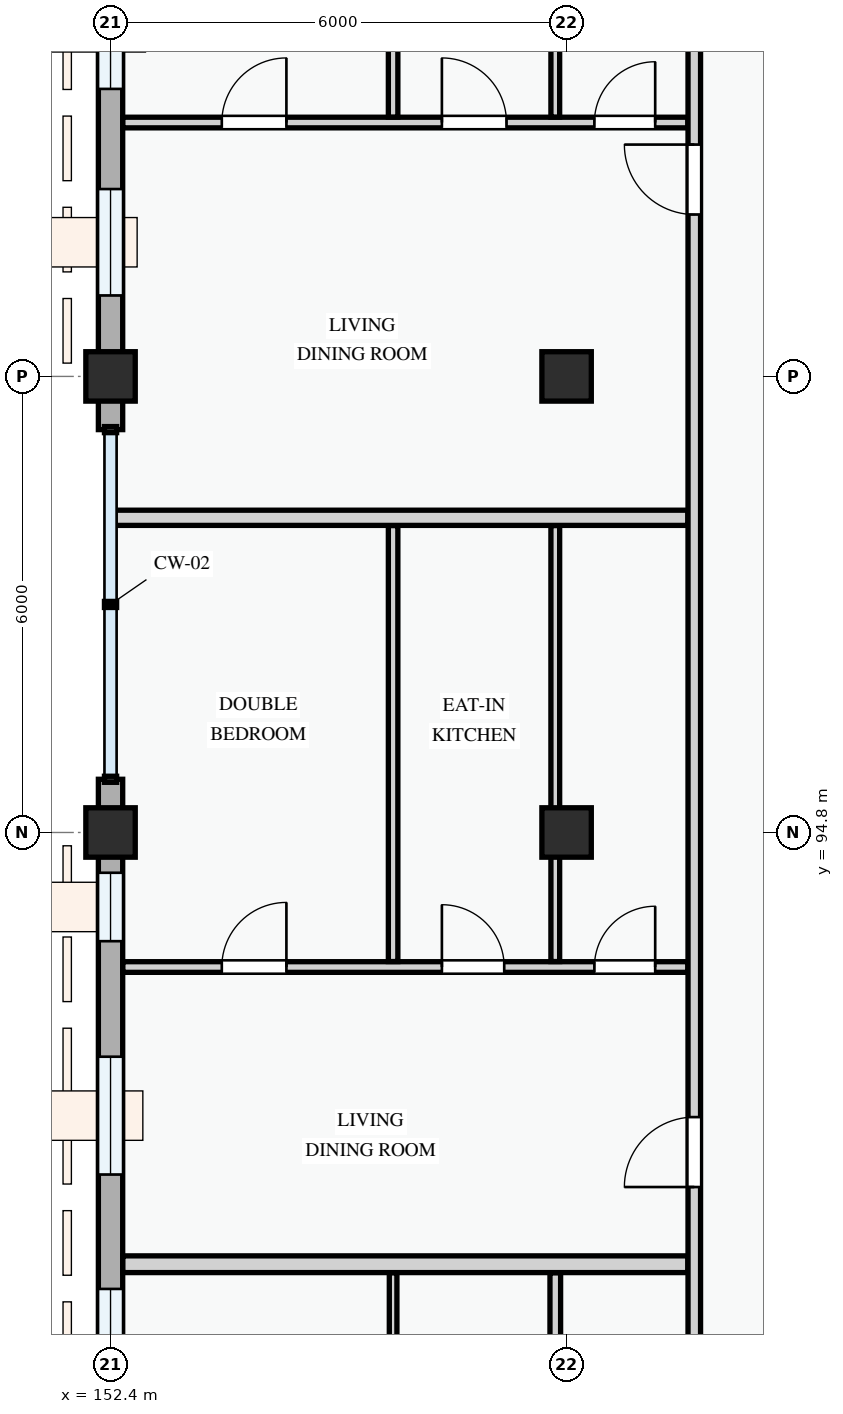
"""IFC4 building model, lengths in metres.
Left out: names, types, materials, properties, quantities, classifications, styles, units other than length and angle.
Written with IfcOpenShell. Run it as: python <this file> out.ifc"""

import sys

from ifc_helpers import new_model, si_unit, direction, frame, frame_2d, origin, origin_2d, place, context, subcontext, project, spatial, rectangle, extrude, element, fill, save


model = new_model("IFC4")
c1 = context("Model", 3, precision=1e-05, world=origin(), true_north=direction((0.0, 1.0)))
c2 = subcontext(c1, "Body", "Model", "MODEL_VIEW")
j1 = project(units=[si_unit("LENGTHUNIT", "METRE"), si_unit("PLANEANGLEUNIT", "RADIAN")], contexts=[c1])
p1 = place(None, origin())
s1 = spatial("IfcSite", under=j1, at=p1, CompositionType="ELEMENT")
p2 = place(p1, origin())
s2 = spatial("IfcBuilding", under=s1, at=p2, CompositionType="ELEMENT")
p3 = place(p2, frame((0.0, 0.0, 18.0)))
s3 = spatial("IfcBuildingStorey", under=s2, at=p3, CompositionType="ELEMENT", Elevation=18.0)
for number, where, z_axis, x_axis in (
    (1, (152.4, 94.8, 0.0), (0.0, 0.0, 1.0), (1.0, 0.0, 0.0)),
    (2, (152.4, 100.8, 0.0), (0.0, 0.0, 1.0), (1.0, 0.0, 0.0)),
    (3, (158.4, 94.8, 0.0), (0.0, 0.0, 1.0), (1.0, 0.0, 0.0)),
    (4, (158.4, 100.8, 0.0), (0.0, 0.0, 1.0), (1.0, 0.0, 0.0)),
):
    element("IfcColumn", number, at=place(p3, frame(where, z_axis=z_axis, x_axis=x_axis)), inside=s3, PredefinedType="COLUMN", context=c2, shape_type="SweptSolid", body=[
        extrude(rectangle(XDim=0.65, YDim=0.65, at=origin_2d()), origin(), (0.0, 0.0, 1.0), 3.3),
    ])
p4 = place(p3, frame((152.4, 109.2, 0.0), z_axis=(0.0, 0.0, 1.0), x_axis=(0.0, -1.0, 0.0)))
e5 = element("IfcWall", 5, at=p4, inside=s3, PredefinedType="STANDARD", context=c2, shape_type="SweptSolid", body=[
    extrude(rectangle(XDim=8.4, YDim=0.32, at=frame_2d((4.2, 0.0))), origin(), (0.0, 0.0, 1.0), 2.425),
])
p5 = place(p4, frame((0.817, 0.0, 0.78)))
e6 = element("IfcOpeningElement", 6, at=p5, cuts=e5, PredefinedType="OPENING", context=c2, shape_type="SweptSolid", body=[
    extrude(rectangle(XDim=1.25, YDim=1.45, at=frame_2d((0.625, 0.725))), frame((0.0, 0.17, 0.0), z_axis=(0.0, -1.0, 0.0), x_axis=(1.0, 0.0, 0.0)), (0.0, 0.0, 1.0), 0.34),
])
p6 = place(p4, frame((2.998, 0.0, 0.78)))
e7 = element("IfcOpeningElement", 7, at=p6, cuts=e5, PredefinedType="OPENING", context=c2, shape_type="SweptSolid", body=[
    extrude(rectangle(XDim=1.62, YDim=1.38, at=frame_2d((0.81, 0.69))), frame((0.0, 0.17, 0.0), z_axis=(0.0, -1.0, 0.0), x_axis=(1.0, 0.0, 0.0)), (0.0, 0.0, 1.0), 0.34),
])
p7 = place(p4, frame((5.935, 0.0, 0.78)))
e8 = element("IfcOpeningElement", 8, at=p7, cuts=e5, PredefinedType="OPENING", context=c2, shape_type="SweptSolid", body=[
    extrude(rectangle(XDim=1.4, YDim=1.45, at=frame_2d((0.7, 0.725))), frame((0.0, 0.17, 0.0), z_axis=(0.0, -1.0, 0.0), x_axis=(1.0, 0.0, 0.0)), (0.0, 0.0, 1.0), 0.34),
])
for number, where, z_axis, x_axis in (
    (9, (152.4, 100.8, 0.0), (0.0, 0.0, 1.0), (0.0, -1.0, 0.0)),
    (10, (152.4, 95.5, 0.0), (0.0, 0.0, 1.0), (0.0, -1.0, 0.0)),
):
    element("IfcWall", number, at=place(p3, frame(where, z_axis=z_axis, x_axis=x_axis)), inside=s3, PredefinedType="STANDARD", context=c2, shape_type="SweptSolid", body=[
        extrude(rectangle(XDim=0.7, YDim=0.32, at=frame_2d((0.35, 0.0))), origin(), (0.0, 0.0, 1.0), 2.575),
    ])
p8 = place(p3, frame((152.4, 94.8, 0.0), z_axis=(0.0, 0.0, 1.0), x_axis=(0.0, -1.0, 0.0)))
e11 = element("IfcWall", 11, at=p8, inside=s3, PredefinedType="STANDARD", context=c2, shape_type="SweptSolid", body=[
    extrude(rectangle(XDim=8.4, YDim=0.32, at=frame_2d((4.2, 0.0))), origin(), (0.0, 0.0, 1.0), 2.425),
])
p9 = place(p8, frame((0.53, 0.0, 0.78)))
e12 = element("IfcOpeningElement", 12, at=p9, cuts=e11, PredefinedType="OPENING", context=c2, shape_type="SweptSolid", body=[
    extrude(rectangle(XDim=0.9, YDim=1.2, at=frame_2d((0.45, 0.6))), frame((0.0, 0.17, 0.0), z_axis=(0.0, -1.0, 0.0), x_axis=(1.0, 0.0, 0.0)), (0.0, 0.0, 1.0), 0.34),
])
p10 = place(p8, frame((2.95, 0.0, 0.78)))
e13 = element("IfcOpeningElement", 13, at=p10, cuts=e11, PredefinedType="OPENING", context=c2, shape_type="SweptSolid", body=[
    extrude(rectangle(XDim=1.55, YDim=1.4, at=frame_2d((0.775, 0.7))), frame((0.0, 0.17, 0.0), z_axis=(0.0, -1.0, 0.0), x_axis=(1.0, 0.0, 0.0)), (0.0, 0.0, 1.0), 0.34),
])
p11 = place(p8, frame((6.005, 0.0, 0.78)))
e14 = element("IfcOpeningElement", 14, at=p11, cuts=e11, PredefinedType="OPENING", context=c2, shape_type="SweptSolid", body=[
    extrude(rectangle(XDim=1.88, YDim=1.52, at=frame_2d((0.94, 0.76))), frame((0.0, 0.17, 0.0), z_axis=(0.0, -1.0, 0.0), x_axis=(1.0, 0.0, 0.0)), (0.0, 0.0, 1.0), 0.34),
])
p12 = place(p3, frame((156.118, 84.649, 0.0), z_axis=(0.0, 0.0, 1.0), x_axis=(0.0, 1.0, 0.0)))
e15 = element("IfcWall", 15, at=p12, inside=s3, PredefinedType="PARTITIONING", context=c2, shape_type="SweptSolid", body=[
    extrude(rectangle(XDim=4.359, YDim=0.1, at=frame_2d((2.179, 0.0))), origin(), (0.0, 0.0, 1.0), 3.0),
])
p13 = place(p3, frame((158.251, 84.649, 0.0), z_axis=(0.0, 0.0, 1.0), x_axis=(0.0, 1.0, 0.0)))
e16 = element("IfcWall", 16, at=p13, inside=s3, PredefinedType="PARTITIONING", context=c2, shape_type="SweptSolid", body=[
    extrude(rectangle(XDim=4.359, YDim=0.14, at=frame_2d((2.179, 0.0))), origin(), (0.0, 0.0, 1.0), 2.425),
])
p14 = place(p3, frame((152.562, 93.03, 0.0), z_axis=(0.0, 0.0, 1.0), x_axis=(1.0, 0.0, 0.0)))
e17 = element("IfcWall", 17, at=p14, inside=s3, PredefinedType="PARTITIONING", context=c2, shape_type="SweptSolid", body=[
    extrude(rectangle(XDim=7.434, YDim=0.14, at=frame_2d((3.717, 0.0))), origin(), (0.0, 0.0, 1.0), 3.0),
])
p15 = place(p14, frame((1.302, 0.0, 0.0)))
e18 = element("IfcOpeningElement", 18, at=p15, cuts=e17, PredefinedType="OPENING", context=c2, shape_type="SweptSolid", body=[
    extrude(rectangle(XDim=0.85, YDim=2.1, at=frame_2d((0.425, 1.05))), frame((0.0, 0.08, 0.0), z_axis=(0.0, -1.0, 0.0), x_axis=(1.0, 0.0, 0.0)), (0.0, 0.0, 1.0), 0.16),
])
p16 = place(p14, frame((4.198, 0.0, 0.0)))
e19 = element("IfcOpeningElement", 19, at=p16, cuts=e17, PredefinedType="OPENING", context=c2, shape_type="SweptSolid", body=[
    extrude(rectangle(XDim=0.82, YDim=2.08, at=frame_2d((0.41, 1.04))), frame((0.0, 0.08, 0.0), z_axis=(0.0, -1.0, 0.0), x_axis=(1.0, 0.0, 0.0)), (0.0, 0.0, 1.0), 0.16),
])
p17 = place(p14, frame((6.204, 0.0, 0.0)))
e20 = element("IfcOpeningElement", 20, at=p17, cuts=e17, PredefinedType="OPENING", context=c2, shape_type="SweptSolid", body=[
    extrude(rectangle(XDim=0.8, YDim=2.1, at=frame_2d((0.4, 1.05))), frame((0.0, 0.08, 0.0), z_axis=(0.0, -1.0, 0.0), x_axis=(1.0, 0.0, 0.0)), (0.0, 0.0, 1.0), 0.16),
])
p18 = place(p3, frame((156.118, 93.102, 0.0), z_axis=(0.0, 0.0, 1.0), x_axis=(0.0, 1.0, 0.0)))
e21 = element("IfcWall", 21, at=p18, inside=s3, PredefinedType="PARTITIONING", context=c2, shape_type="SweptSolid", body=[
    extrude(rectangle(XDim=5.736, YDim=0.125, at=frame_2d((2.868, 0.0))), origin(), (0.0, 0.0, 1.0), 3.0),
])
p19 = place(p3, frame((158.251, 93.102, 0.0), z_axis=(0.0, 0.0, 1.0), x_axis=(0.0, 1.0, 0.0)))
e22 = element("IfcWall", 22, at=p19, inside=s3, PredefinedType="PARTITIONING", context=c2, shape_type="SweptSolid", body=[
    extrude(rectangle(XDim=5.736, YDim=0.115, at=frame_2d((2.868, 0.0))), origin(), (0.0, 0.0, 1.0), 2.425),
])
p20 = place(p3, frame((152.562, 89.12, 0.0), z_axis=(0.0, 0.0, 1.0), x_axis=(1.0, 0.0, 0.0)))
e23 = element("IfcWall", 23, at=p20, inside=s3, PredefinedType="PARTITIONING", context=c2, shape_type="SweptSolid", body=[
    extrude(rectangle(XDim=7.434, YDim=0.22, at=frame_2d((3.717, 0.0))), origin(), (0.0, 0.0, 1.0), 3.0),
])
p21 = place(p3, frame((152.562, 104.14, 0.0), z_axis=(0.0, 0.0, 1.0), x_axis=(1.0, 0.0, 0.0)))
e24 = element("IfcWall", 24, at=p21, inside=s3, PredefinedType="PARTITIONING", context=c2, shape_type="SweptSolid", body=[
    extrude(rectangle(XDim=7.434, YDim=0.14, at=frame_2d((3.717, 0.0))), origin(), (0.0, 0.0, 1.0), 3.0),
])
p22 = place(p21, frame((1.302, 0.0, 0.0)))
e25 = element("IfcOpeningElement", 25, at=p22, cuts=e24, PredefinedType="OPENING", context=c2, shape_type="SweptSolid", body=[
    extrude(rectangle(XDim=0.85, YDim=2.1, at=frame_2d((0.425, 1.05))), frame((0.0, 0.08, 0.0), z_axis=(0.0, -1.0, 0.0), x_axis=(1.0, 0.0, 0.0)), (0.0, 0.0, 1.0), 0.16),
])
p23 = place(p21, frame((4.198, 0.0, 0.0)))
e26 = element("IfcOpeningElement", 26, at=p23, cuts=e24, PredefinedType="OPENING", context=c2, shape_type="SweptSolid", body=[
    extrude(rectangle(XDim=0.85, YDim=2.1, at=frame_2d((0.425, 1.05))), frame((0.0, 0.08, 0.0), z_axis=(0.0, -1.0, 0.0), x_axis=(1.0, 0.0, 0.0)), (0.0, 0.0, 1.0), 0.16),
])
p24 = place(p21, frame((6.204, 0.0, 0.0)))
e27 = element("IfcOpeningElement", 27, at=p24, cuts=e24, PredefinedType="OPENING", context=c2, shape_type="SweptSolid", body=[
    extrude(rectangle(XDim=0.8, YDim=2.1, at=frame_2d((0.4, 1.05))), frame((0.0, 0.08, 0.0), z_axis=(0.0, -1.0, 0.0), x_axis=(1.0, 0.0, 0.0)), (0.0, 0.0, 1.0), 0.16),
])
p25 = place(p3, frame((156.118, 104.212, 0.0), z_axis=(0.0, 0.0, 1.0), x_axis=(0.0, 1.0, 0.0)))
e28 = element("IfcWall", 28, at=p25, inside=s3, PredefinedType="PARTITIONING", context=c2, shape_type="SweptSolid", body=[
    extrude(rectangle(XDim=5.034, YDim=0.125, at=frame_2d((2.517, 0.0))), origin(), (0.0, 0.0, 1.0), 3.0),
])
p26 = place(p3, frame((158.251, 104.212, 0.0), z_axis=(0.0, 0.0, 1.0), x_axis=(0.0, 1.0, 0.0)))
e29 = element("IfcWall", 29, at=p26, inside=s3, PredefinedType="PARTITIONING", context=c2, shape_type="SweptSolid", body=[
    extrude(rectangle(XDim=5.034, YDim=0.115, at=frame_2d((2.517, 0.0))), origin(), (0.0, 0.0, 1.0), 2.425),
])
p27 = place(p3, frame((152.46, 98.94, 0.0), z_axis=(0.0, 0.0, 1.0), x_axis=(1.0, 0.0, 0.0)))
e30 = element("IfcWall", 30, at=p27, inside=s3, PredefinedType="PARTITIONING", context=c2, shape_type="SweptSolid", body=[
    extrude(rectangle(XDim=7.536, YDim=0.2, at=frame_2d((3.768, 0.0))), origin(), (0.0, 0.0, 1.0), 3.0),
])
p28 = place(p3, frame((160.08, 80.46, 0.0), z_axis=(0.0, 0.0, 1.0), x_axis=(0.0, 1.0, 0.0)))
e31 = element("IfcWall", 31, at=p28, inside=s3, PredefinedType="PARTITIONING", context=c2, shape_type="SweptSolid", body=[
    extrude(rectangle(XDim=28.88, YDim=0.165, at=frame_2d((14.44, 0.0))), origin(), (0.0, 0.0, 1.0), 3.0),
])
p29 = place(p28, frame((2.419, 0.0, 0.0)))
e32 = element("IfcOpeningElement", 32, at=p29, cuts=e31, PredefinedType="OPENING", context=c2, shape_type="SweptSolid", body=[
    extrude(rectangle(XDim=0.96, YDim=2.12, at=frame_2d((0.48, 1.06))), frame((0.0, 0.093, 0.0), z_axis=(0.0, -1.0, 0.0), x_axis=(1.0, 0.0, 0.0)), (0.0, 0.0, 1.0), 0.185),
])
p30 = place(p28, frame((9.676, 0.0, 0.0)))
e33 = element("IfcOpeningElement", 33, at=p30, cuts=e31, PredefinedType="OPENING", context=c2, shape_type="SweptSolid", body=[
    extrude(rectangle(XDim=0.92, YDim=2.1, at=frame_2d((0.46, 1.05))), frame((0.0, 0.093, 0.0), z_axis=(0.0, -1.0, 0.0), x_axis=(1.0, 0.0, 0.0)), (0.0, 0.0, 1.0), 0.185),
])
p31 = place(p28, frame((22.47, 0.0, 0.0)))
e34 = element("IfcOpeningElement", 34, at=p31, cuts=e31, PredefinedType="OPENING", context=c2, shape_type="SweptSolid", body=[
    extrude(rectangle(XDim=0.92, YDim=2.1, at=frame_2d((0.46, 1.05))), frame((0.0, 0.093, 0.0), z_axis=(0.0, -1.0, 0.0), x_axis=(1.0, 0.0, 0.0)), (0.0, 0.0, 1.0), 0.185),
])
p32 = place(p6, origin())
e35 = element("IfcWindow", 35, at=p32, inside=s3, PartitioningType="DOUBLE_PANEL_VERTICAL", PredefinedType="WINDOW", context=c2, shape_type="SweptSolid", body=[
    extrude(rectangle(XDim=1.62, YDim=1.38, at=frame_2d((0.81, 0.69))), frame((0.0, 0.03, 0.0), z_axis=(0.0, -1.0, 0.0), x_axis=(1.0, 0.0, 0.0)), (0.0, 0.0, 1.0), 0.06),
])
fill(e7, e35)
p33 = place(p7, origin())
e36 = element("IfcWindow", 36, at=p33, inside=s3, PartitioningType="SINGLE_PANEL", PredefinedType="WINDOW", context=c2, shape_type="SweptSolid", body=[
    extrude(rectangle(XDim=1.4, YDim=1.45, at=frame_2d((0.7, 0.725))), frame((0.0, 0.03, 0.0), z_axis=(0.0, -1.0, 0.0), x_axis=(1.0, 0.0, 0.0)), (0.0, 0.0, 1.0), 0.06),
])
fill(e8, e36)
p34 = place(p9, origin())
e37 = element("IfcWindow", 37, at=p34, inside=s3, PartitioningType="SINGLE_PANEL", PredefinedType="WINDOW", context=c2, shape_type="SweptSolid", body=[
    extrude(rectangle(XDim=0.9, YDim=1.2, at=frame_2d((0.45, 0.6))), frame((0.0, 0.03, 0.0), z_axis=(0.0, -1.0, 0.0), x_axis=(1.0, 0.0, 0.0)), (0.0, 0.0, 1.0), 0.06),
])
fill(e12, e37)
p35 = place(p10, origin())
e38 = element("IfcWindow", 38, at=p35, inside=s3, PartitioningType="SINGLE_PANEL", PredefinedType="WINDOW", context=c2, shape_type="SweptSolid", body=[
    extrude(rectangle(XDim=1.55, YDim=1.4, at=frame_2d((0.775, 0.7))), frame((0.0, 0.03, 0.0), z_axis=(0.0, -1.0, 0.0), x_axis=(1.0, 0.0, 0.0)), (0.0, 0.0, 1.0), 0.06),
])
fill(e13, e38)
p36 = place(p11, origin())
e39 = element("IfcWindow", 39, at=p36, inside=s3, PartitioningType="DOUBLE_PANEL_VERTICAL", PredefinedType="WINDOW", context=c2, shape_type="SweptSolid", body=[
    extrude(rectangle(XDim=1.88, YDim=1.52, at=frame_2d((0.94, 0.76))), frame((0.0, 0.03, 0.0), z_axis=(0.0, -1.0, 0.0), x_axis=(1.0, 0.0, 0.0)), (0.0, 0.0, 1.0), 0.06),
])
fill(e14, e39)
p37 = place(p15, origin())
e40 = element("IfcDoor", 40, at=p37, inside=s3, OperationType="SINGLE_SWING_RIGHT", PredefinedType="DOOR", context=c2, shape_type="SweptSolid", body=[
    extrude(rectangle(XDim=0.85, YDim=2.1, at=frame_2d((0.425, 1.05))), frame((0.0, 0.025, 0.0), z_axis=(0.0, -1.0, 0.0), x_axis=(1.0, 0.0, 0.0)), (0.0, 0.0, 1.0), 0.05),
])
fill(e18, e40)
p38 = place(p16, origin())
e41 = element("IfcDoor", 41, at=p38, inside=s3, OperationType="SINGLE_SWING_LEFT", PredefinedType="DOOR", context=c2, shape_type="SweptSolid", body=[
    extrude(rectangle(XDim=0.82, YDim=2.08, at=frame_2d((0.41, 1.04))), frame((0.0, 0.025, 0.0), z_axis=(0.0, -1.0, 0.0), x_axis=(1.0, 0.0, 0.0)), (0.0, 0.0, 1.0), 0.05),
])
fill(e19, e41)
p39 = place(p17, origin())
e42 = element("IfcDoor", 42, at=p39, inside=s3, OperationType="SINGLE_SWING_RIGHT", PredefinedType="DOOR", context=c2, shape_type="SweptSolid", body=[
    extrude(rectangle(XDim=0.8, YDim=2.1, at=frame_2d((0.4, 1.05))), frame((0.0, 0.025, 0.0), z_axis=(0.0, -1.0, 0.0), x_axis=(1.0, 0.0, 0.0)), (0.0, 0.0, 1.0), 0.05),
])
fill(e20, e42)
p40 = place(p22, origin())
e43 = element("IfcDoor", 43, at=p40, inside=s3, OperationType="SINGLE_SWING_RIGHT", PredefinedType="DOOR", context=c2, shape_type="SweptSolid", body=[
    extrude(rectangle(XDim=0.85, YDim=2.1, at=frame_2d((0.425, 1.05))), frame((0.0, 0.025, 0.0), z_axis=(0.0, -1.0, 0.0), x_axis=(1.0, 0.0, 0.0)), (0.0, 0.0, 1.0), 0.05),
])
fill(e25, e43)
p41 = place(p23, origin())
e44 = element("IfcDoor", 44, at=p41, inside=s3, OperationType="SINGLE_SWING_LEFT", PredefinedType="DOOR", context=c2, shape_type="SweptSolid", body=[
    extrude(rectangle(XDim=0.85, YDim=2.1, at=frame_2d((0.425, 1.05))), frame((0.0, 0.025, 0.0), z_axis=(0.0, -1.0, 0.0), x_axis=(1.0, 0.0, 0.0)), (0.0, 0.0, 1.0), 0.05),
])
fill(e26, e44)
p42 = place(p24, origin())
e45 = element("IfcDoor", 45, at=p42, inside=s3, OperationType="SINGLE_SWING_RIGHT", PredefinedType="DOOR", context=c2, shape_type="SweptSolid", body=[
    extrude(rectangle(XDim=0.8, YDim=2.1, at=frame_2d((0.4, 1.05))), frame((0.0, 0.025, 0.0), z_axis=(0.0, -1.0, 0.0), x_axis=(1.0, 0.0, 0.0)), (0.0, 0.0, 1.0), 0.05),
])
fill(e27, e45)
p43 = place(p30, origin())
e46 = element("IfcDoor", 46, at=p43, inside=s3, OperationType="SINGLE_SWING_LEFT", PredefinedType="DOOR", context=c2, shape_type="SweptSolid", body=[
    extrude(rectangle(XDim=0.92, YDim=2.1, at=frame_2d((0.46, 1.05))), frame((0.0, 0.025, 0.0), z_axis=(0.0, -1.0, 0.0), x_axis=(1.0, 0.0, 0.0)), (0.0, 0.0, 1.0), 0.05),
])
fill(e33, e46)
p44 = place(p31, origin())
e47 = element("IfcDoor", 47, at=p44, inside=s3, OperationType="SINGLE_SWING_RIGHT", PredefinedType="DOOR", context=c2, shape_type="SweptSolid", body=[
    extrude(rectangle(XDim=0.92, YDim=2.1, at=frame_2d((0.46, 1.05))), frame((0.0, 0.025, 0.0), z_axis=(0.0, -1.0, 0.0), x_axis=(1.0, 0.0, 0.0)), (0.0, 0.0, 1.0), 0.05),
])
fill(e34, e47)
save(model, sys.argv[1])
